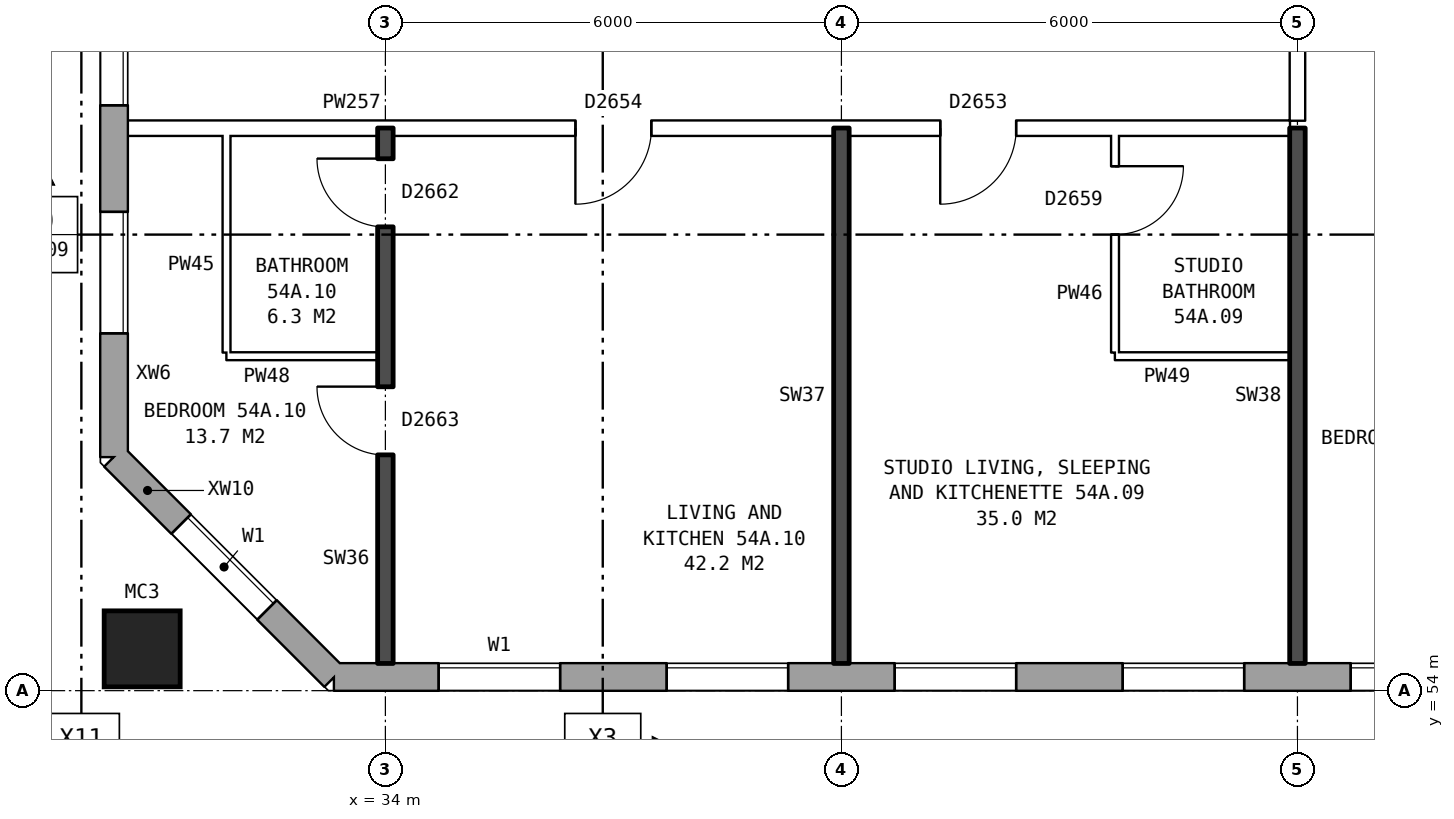
"""IFC4 building model, lengths in metres.
Left out: names, types, materials, properties, quantities, classifications, styles, units other than length and angle.
Written with IfcOpenShell. Run it as: python <this file> out.ifc"""

import sys

from ifc_helpers import new_model, si_unit, direction, frame, frame_2d, origin, origin_2d, place, context, subcontext, project, spatial, rectangle, hollow_rectangle, extrude, element, fill, save


model = new_model("IFC4")
c1 = context("Model", 3, precision=1e-05, world=origin(), true_north=direction((0.0, 1.0)))
c2 = subcontext(c1, "Body", "Model", "MODEL_VIEW")
j1 = project(units=[si_unit("LENGTHUNIT", "METRE"), si_unit("PLANEANGLEUNIT", "RADIAN")], contexts=[c1])
p1 = place(None, origin())
s1 = spatial("IfcSite", under=j1, at=p1, CompositionType="ELEMENT")
p2 = place(p1, origin())
s2 = spatial("IfcBuilding", under=s1, at=p2, CompositionType="ELEMENT")
p3 = place(p2, frame((0.0, 0.0, 191.3)))
s3 = spatial("IfcBuildingStorey", under=s2, at=p3, CompositionType="ELEMENT", Elevation=191.3)
p4 = place(p3, frame((30.8, 54.55, 0.0), z_axis=(0.0, 0.0, 1.0), x_axis=(1.0, 0.0, 0.0)))
e1 = element("IfcColumn", 1, at=p4, inside=s3, PredefinedType="COLUMN", context=c2, shape_type="SweptSolid", body=[
    extrude(hollow_rectangle(XDim=1.0, YDim=1.0, WallThickness=0.055, at=origin_2d()), origin(), (0.0, 0.0, 1.0), 3.1),
])
p5 = place(p3, frame((30.43, 57.075, 0.0), z_axis=(0.0, 0.0, 1.0), x_axis=(0.707106781187, -0.707106781187, 0.0)))
e2 = element("IfcWall", 2, at=p5, inside=s3, PredefinedType="STANDARD", context=c2, shape_type="SweptSolid", body=[
    extrude(rectangle(XDim=4.094, YDim=0.36, at=frame_2d((2.047, 0.0))), origin(), (0.0, 0.0, 1.0), 2.85),
])
p6 = place(p5, frame((1.247, 0.0, 0.8)))
e3 = element("IfcOpeningElement", 3, at=p6, cuts=e2, PredefinedType="OPENING", context=c2, shape_type="SweptSolid", body=[
    extrude(rectangle(XDim=1.6, YDim=1.8, at=frame_2d((0.8, 0.9))), frame((0.0, 0.19, 0.0), z_axis=(0.0, -1.0, 0.0), x_axis=(1.0, 0.0, 0.0)), (0.0, 0.0, 1.0), 0.38),
])
p7 = place(p3, frame((33.325, 54.18, 0.0), z_axis=(0.0, 0.0, 1.0), x_axis=(1.0, 0.0, 0.0)))
e4 = element("IfcWall", 4, at=p7, inside=s3, PredefinedType="STANDARD", context=c2, shape_type="SweptSolid", body=[
    extrude(rectangle(XDim=39.601, YDim=0.36, at=frame_2d((19.8, 0.0))), origin(), (0.0, 0.0, 1.0), 2.85),
])
p8 = place(p7, frame((1.375, 0.0, 0.8)))
e5 = element("IfcOpeningElement", 5, at=p8, cuts=e4, PredefinedType="OPENING", context=c2, shape_type="SweptSolid", body=[
    extrude(rectangle(XDim=1.6, YDim=1.8, at=frame_2d((0.8, 0.9))), frame((0.0, 0.19, 0.0), z_axis=(0.0, -1.0, 0.0), x_axis=(1.0, 0.0, 0.0)), (0.0, 0.0, 1.0), 0.38),
])
p9 = place(p7, frame((4.375, 0.0, 0.8)))
e6 = element("IfcOpeningElement", 6, at=p9, cuts=e4, PredefinedType="OPENING", context=c2, shape_type="SweptSolid", body=[
    extrude(rectangle(XDim=1.6, YDim=1.8, at=frame_2d((0.8, 0.9))), frame((0.0, 0.19, 0.0), z_axis=(0.0, -1.0, 0.0), x_axis=(1.0, 0.0, 0.0)), (0.0, 0.0, 1.0), 0.38),
])
p10 = place(p7, frame((7.375, 0.0, 0.8)))
e7 = element("IfcOpeningElement", 7, at=p10, cuts=e4, PredefinedType="OPENING", context=c2, shape_type="SweptSolid", body=[
    extrude(rectangle(XDim=1.6, YDim=1.8, at=frame_2d((0.8, 0.9))), frame((0.0, 0.19, 0.0), z_axis=(0.0, -1.0, 0.0), x_axis=(1.0, 0.0, 0.0)), (0.0, 0.0, 1.0), 0.38),
])
p11 = place(p7, frame((10.375, 0.0, 0.8)))
e8 = element("IfcOpeningElement", 8, at=p11, cuts=e4, PredefinedType="OPENING", context=c2, shape_type="SweptSolid", body=[
    extrude(rectangle(XDim=1.6, YDim=1.8, at=frame_2d((0.8, 0.9))), frame((0.0, 0.19, 0.0), z_axis=(0.0, -1.0, 0.0), x_axis=(1.0, 0.0, 0.0)), (0.0, 0.0, 1.0), 0.38),
])
p12 = place(p7, frame((13.375, 0.0, 0.8)))
e9 = element("IfcOpeningElement", 9, at=p12, cuts=e4, PredefinedType="OPENING", context=c2, shape_type="SweptSolid", body=[
    extrude(rectangle(XDim=1.6, YDim=1.8, at=frame_2d((0.8, 0.9))), frame((0.0, 0.19, 0.0), z_axis=(0.0, -1.0, 0.0), x_axis=(1.0, 0.0, 0.0)), (0.0, 0.0, 1.0), 0.38),
])
p13 = place(p7, frame((15.825, 0.0, 0.8)))
e10 = element("IfcOpeningElement", 10, at=p13, cuts=e4, PredefinedType="OPENING", context=c2, shape_type="SweptSolid", body=[
    extrude(rectangle(XDim=1.4, YDim=1.8, at=frame_2d((0.7, 0.9))), frame((0.0, 0.19, 0.0), z_axis=(0.0, -1.0, 0.0), x_axis=(1.0, 0.0, 0.0)), (0.0, 0.0, 1.0), 0.38),
])
p14 = place(p7, frame((18.975, 0.0, 0.15)))
e11 = element("IfcOpeningElement", 11, at=p14, cuts=e4, PredefinedType="OPENING", context=c2, shape_type="SweptSolid", body=[
    extrude(rectangle(XDim=1.6, YDim=1.2, at=frame_2d((0.8, 0.6))), frame((0.0, 0.19, 0.0), z_axis=(0.0, -1.0, 0.0), x_axis=(1.0, 0.0, 0.0)), (0.0, 0.0, 1.0), 0.38),
])
p15 = place(p7, frame((22.375, 0.0, 0.8)))
e12 = element("IfcOpeningElement", 12, at=p15, cuts=e4, PredefinedType="OPENING", context=c2, shape_type="SweptSolid", body=[
    extrude(rectangle(XDim=1.6, YDim=1.8, at=frame_2d((0.8, 0.9))), frame((0.0, 0.19, 0.0), z_axis=(0.0, -1.0, 0.0), x_axis=(1.0, 0.0, 0.0)), (0.0, 0.0, 1.0), 0.38),
])
p16 = place(p7, frame((25.375, 0.0, 0.8)))
e13 = element("IfcOpeningElement", 13, at=p16, cuts=e4, PredefinedType="OPENING", context=c2, shape_type="SweptSolid", body=[
    extrude(rectangle(XDim=1.6, YDim=1.8, at=frame_2d((0.8, 0.9))), frame((0.0, 0.19, 0.0), z_axis=(0.0, -1.0, 0.0), x_axis=(1.0, 0.0, 0.0)), (0.0, 0.0, 1.0), 0.38),
])
p17 = place(p7, frame((28.375, 0.0, 0.8)))
e14 = element("IfcOpeningElement", 14, at=p17, cuts=e4, PredefinedType="OPENING", context=c2, shape_type="SweptSolid", body=[
    extrude(rectangle(XDim=1.6, YDim=1.8, at=frame_2d((0.8, 0.9))), frame((0.0, 0.19, 0.0), z_axis=(0.0, -1.0, 0.0), x_axis=(1.0, 0.0, 0.0)), (0.0, 0.0, 1.0), 0.38),
])
p18 = place(p7, frame((31.375, 0.0, 0.8)))
e15 = element("IfcOpeningElement", 15, at=p18, cuts=e4, PredefinedType="OPENING", context=c2, shape_type="SweptSolid", body=[
    extrude(rectangle(XDim=1.6, YDim=1.8, at=frame_2d((0.8, 0.9))), frame((0.0, 0.19, 0.0), z_axis=(0.0, -1.0, 0.0), x_axis=(1.0, 0.0, 0.0)), (0.0, 0.0, 1.0), 0.38),
])
p19 = place(p7, frame((34.375, 0.0, 0.8)))
e16 = element("IfcOpeningElement", 16, at=p19, cuts=e4, PredefinedType="OPENING", context=c2, shape_type="SweptSolid", body=[
    extrude(rectangle(XDim=1.6, YDim=1.8, at=frame_2d((0.8, 0.9))), frame((0.0, 0.19, 0.0), z_axis=(0.0, -1.0, 0.0), x_axis=(1.0, 0.0, 0.0)), (0.0, 0.0, 1.0), 0.38),
])
p20 = place(p7, frame((37.375, 0.0, 0.8)))
e17 = element("IfcOpeningElement", 17, at=p20, cuts=e4, PredefinedType="OPENING", context=c2, shape_type="SweptSolid", body=[
    extrude(rectangle(XDim=1.6, YDim=1.8, at=frame_2d((0.8, 0.9))), frame((0.0, 0.19, 0.0), z_axis=(0.0, -1.0, 0.0), x_axis=(1.0, 0.0, 0.0)), (0.0, 0.0, 1.0), 0.38),
])
p21 = place(p7, frame((17.525, 0.0, 1.6)))
e18 = element("IfcOpeningElement", 18, at=p21, cuts=e4, PredefinedType="OPENING", context=c2, shape_type="SweptSolid", body=[
    extrude(rectangle(XDim=0.6, YDim=0.9, at=frame_2d((0.3, 0.45))), frame((0.0, 0.19, 0.0), z_axis=(0.0, -1.0, 0.0), x_axis=(1.0, 0.0, 0.0)), (0.0, 0.0, 1.0), 0.38),
])
p22 = place(p3, frame((30.43, 82.925, 0.0), z_axis=(0.0, 0.0, 1.0), x_axis=(0.0, -1.0, 0.0)))
e19 = element("IfcWall", 19, at=p22, inside=s3, PredefinedType="STANDARD", context=c2, shape_type="SweptSolid", body=[
    extrude(rectangle(XDim=25.851, YDim=0.36, at=frame_2d((12.925, 0.0))), origin(), (0.0, 0.0, 1.0), 2.85),
])
p23 = place(p22, frame((1.625, 0.0, 0.8)))
e20 = element("IfcOpeningElement", 20, at=p23, cuts=e19, PredefinedType="OPENING", context=c2, shape_type="SweptSolid", body=[
    extrude(rectangle(XDim=1.6, YDim=1.8, at=frame_2d((0.8, 0.9))), frame((0.0, 0.19, 0.0), z_axis=(0.0, -1.0, 0.0), x_axis=(1.0, 0.0, 0.0)), (0.0, 0.0, 1.0), 0.38),
])
p24 = place(p22, frame((4.625, 0.0, 0.8)))
e21 = element("IfcOpeningElement", 21, at=p24, cuts=e19, PredefinedType="OPENING", context=c2, shape_type="SweptSolid", body=[
    extrude(rectangle(XDim=1.6, YDim=1.8, at=frame_2d((0.8, 0.9))), frame((0.0, 0.19, 0.0), z_axis=(0.0, -1.0, 0.0), x_axis=(1.0, 0.0, 0.0)), (0.0, 0.0, 1.0), 0.38),
])
p25 = place(p22, frame((7.625, 0.0, 0.8)))
e22 = element("IfcOpeningElement", 22, at=p25, cuts=e19, PredefinedType="OPENING", context=c2, shape_type="SweptSolid", body=[
    extrude(rectangle(XDim=1.6, YDim=1.8, at=frame_2d((0.8, 0.9))), frame((0.0, 0.19, 0.0), z_axis=(0.0, -1.0, 0.0), x_axis=(1.0, 0.0, 0.0)), (0.0, 0.0, 1.0), 0.38),
])
p26 = place(p22, frame((10.625, 0.0, 0.8)))
e23 = element("IfcOpeningElement", 23, at=p26, cuts=e19, PredefinedType="OPENING", context=c2, shape_type="SweptSolid", body=[
    extrude(rectangle(XDim=1.6, YDim=1.8, at=frame_2d((0.8, 0.9))), frame((0.0, 0.19, 0.0), z_axis=(0.0, -1.0, 0.0), x_axis=(1.0, 0.0, 0.0)), (0.0, 0.0, 1.0), 0.38),
])
p27 = place(p22, frame((13.625, 0.0, 0.8)))
e24 = element("IfcOpeningElement", 24, at=p27, cuts=e19, PredefinedType="OPENING", context=c2, shape_type="SweptSolid", body=[
    extrude(rectangle(XDim=1.6, YDim=1.8, at=frame_2d((0.8, 0.9))), frame((0.0, 0.19, 0.0), z_axis=(0.0, -1.0, 0.0), x_axis=(1.0, 0.0, 0.0)), (0.0, 0.0, 1.0), 0.38),
])
p28 = place(p22, frame((16.625, 0.0, 0.8)))
e25 = element("IfcOpeningElement", 25, at=p28, cuts=e19, PredefinedType="OPENING", context=c2, shape_type="SweptSolid", body=[
    extrude(rectangle(XDim=1.6, YDim=1.8, at=frame_2d((0.8, 0.9))), frame((0.0, 0.19, 0.0), z_axis=(0.0, -1.0, 0.0), x_axis=(1.0, 0.0, 0.0)), (0.0, 0.0, 1.0), 0.38),
])
p29 = place(p22, frame((19.625, 0.0, 0.8)))
e26 = element("IfcOpeningElement", 26, at=p29, cuts=e19, PredefinedType="OPENING", context=c2, shape_type="SweptSolid", body=[
    extrude(rectangle(XDim=1.6, YDim=1.8, at=frame_2d((0.8, 0.9))), frame((0.0, 0.19, 0.0), z_axis=(0.0, -1.0, 0.0), x_axis=(1.0, 0.0, 0.0)), (0.0, 0.0, 1.0), 0.38),
])
p30 = place(p22, frame((22.625, 0.0, 0.8)))
e27 = element("IfcOpeningElement", 27, at=p30, cuts=e19, PredefinedType="OPENING", context=c2, shape_type="SweptSolid", body=[
    extrude(rectangle(XDim=1.6, YDim=1.8, at=frame_2d((0.8, 0.9))), frame((0.0, 0.19, 0.0), z_axis=(0.0, -1.0, 0.0), x_axis=(1.0, 0.0, 0.0)), (0.0, 0.0, 1.0), 0.38),
])
p31 = place(p3, frame((31.91, 58.4, 0.0), z_axis=(0.0, 0.0, 1.0), x_axis=(1.0, 0.0, 0.0)))
e28 = element("IfcWall", 28, at=p31, inside=s3, PredefinedType="PARTITIONING", context=c2, shape_type="SweptSolid", body=[
    extrude(rectangle(XDim=1.99, YDim=0.1, at=frame_2d((0.995, 0.0))), origin(), (0.0, 0.0, 1.0), 2.85),
])
p32 = place(p3, frame((43.6, 58.4, 0.0), z_axis=(0.0, 0.0, 1.0), x_axis=(1.0, 0.0, 0.0)))
e29 = element("IfcWall", 29, at=p32, inside=s3, PredefinedType="PARTITIONING", context=c2, shape_type="SweptSolid", body=[
    extrude(rectangle(XDim=2.3, YDim=0.1, at=frame_2d((1.15, 0.0))), origin(), (0.0, 0.0, 1.0), 2.85),
])
p33 = place(p3, frame((30.61, 61.4, 0.0), z_axis=(0.0, 0.0, 1.0), x_axis=(1.0, 0.0, 0.0)))
e30 = element("IfcWall", 30, at=p33, inside=s3, PredefinedType="PARTITIONING", context=c2, shape_type="SweptSolid", body=[
    extrude(rectangle(XDim=15.29, YDim=0.2, at=frame_2d((7.645, 0.0))), origin(), (0.0, 0.0, 1.0), 2.85),
])
p34 = place(p33, frame((10.69, 0.0, 0.0)))
e31 = element("IfcOpeningElement", 31, at=p34, cuts=e30, PredefinedType="OPENING", context=c2, shape_type="SweptSolid", body=[
    extrude(rectangle(XDim=1.0, YDim=2.1, at=frame_2d((0.5, 1.05))), frame((0.0, 0.11, 0.0), z_axis=(0.0, -1.0, 0.0), x_axis=(1.0, 0.0, 0.0)), (0.0, 0.0, 1.0), 0.22),
])
p35 = place(p33, frame((5.89, 0.0, 0.0)))
e32 = element("IfcOpeningElement", 32, at=p35, cuts=e30, PredefinedType="OPENING", context=c2, shape_type="SweptSolid", body=[
    extrude(rectangle(XDim=1.0, YDim=2.1, at=frame_2d((0.5, 1.05))), frame((0.0, 0.11, 0.0), z_axis=(0.0, -1.0, 0.0), x_axis=(1.0, 0.0, 0.0)), (0.0, 0.0, 1.0), 0.22),
])
p36 = place(p3, frame((31.91, 58.45, 0.0), z_axis=(0.0, 0.0, 1.0), x_axis=(0.0, 1.0, 0.0)))
e33 = element("IfcWall", 33, at=p36, inside=s3, PredefinedType="PARTITIONING", context=c2, shape_type="SweptSolid", body=[
    extrude(rectangle(XDim=2.85, YDim=0.1, at=frame_2d((1.425, 0.0))), origin(), (0.0, 0.0, 1.0), 2.85),
])
p37 = place(p3, frame((34.0, 54.36, 0.0), z_axis=(0.0, 0.0, 1.0), x_axis=(0.0, 1.0, 0.0)))
e34 = element("IfcWall", 34, at=p37, inside=s3, PredefinedType="SOLIDWALL", context=c2, shape_type="SweptSolid", body=[
    extrude(rectangle(XDim=7.04, YDim=0.2, at=frame_2d((3.52, 0.0))), origin(), (0.0, 0.0, 1.0), 2.85),
])
p38 = place(p37, frame((2.74, 0.0, 0.0)))
e35 = element("IfcOpeningElement", 35, at=p38, cuts=e34, PredefinedType="OPENING", context=c2, shape_type="SweptSolid", body=[
    extrude(rectangle(XDim=0.9, YDim=2.1, at=frame_2d((0.45, 1.05))), frame((0.0, 0.11, 0.0), z_axis=(0.0, -1.0, 0.0), x_axis=(1.0, 0.0, 0.0)), (0.0, 0.0, 1.0), 0.22),
])
p39 = place(p37, frame((5.74, 0.0, 0.0)))
e36 = element("IfcOpeningElement", 36, at=p39, cuts=e34, PredefinedType="OPENING", context=c2, shape_type="SweptSolid", body=[
    extrude(rectangle(XDim=0.9, YDim=2.1, at=frame_2d((0.45, 1.05))), frame((0.0, 0.11, 0.0), z_axis=(0.0, -1.0, 0.0), x_axis=(1.0, 0.0, 0.0)), (0.0, 0.0, 1.0), 0.22),
])
p40 = place(p3, frame((40.0, 54.36, 0.0), z_axis=(0.0, 0.0, 1.0), x_axis=(0.0, 1.0, 0.0)))
e37 = element("IfcWall", 37, at=p40, inside=s3, PredefinedType="SOLIDWALL", context=c2, shape_type="SweptSolid", body=[
    extrude(rectangle(XDim=7.04, YDim=0.2, at=frame_2d((3.52, 0.0))), origin(), (0.0, 0.0, 1.0), 2.85),
])
p41 = place(p3, frame((43.6, 58.45, 0.0), z_axis=(0.0, 0.0, 1.0), x_axis=(0.0, 1.0, 0.0)))
e38 = element("IfcWall", 38, at=p41, inside=s3, PredefinedType="PARTITIONING", context=c2, shape_type="SweptSolid", body=[
    extrude(rectangle(XDim=2.85, YDim=0.1, at=frame_2d((1.425, 0.0))), origin(), (0.0, 0.0, 1.0), 2.85),
])
p42 = place(p41, frame((1.55, 0.0, 0.0)))
e39 = element("IfcOpeningElement", 39, at=p42, cuts=e38, PredefinedType="OPENING", context=c2, shape_type="SweptSolid", body=[
    extrude(rectangle(XDim=0.9, YDim=2.1, at=frame_2d((0.45, 1.05))), frame((0.0, 0.06, 0.0), z_axis=(0.0, -1.0, 0.0), x_axis=(1.0, 0.0, 0.0)), (0.0, 0.0, 1.0), 0.12),
])
p43 = place(p3, frame((46.0, 54.36, 0.0), z_axis=(0.0, 0.0, 1.0), x_axis=(0.0, 1.0, 0.0)))
e40 = element("IfcWall", 40, at=p43, inside=s3, PredefinedType="SOLIDWALL", context=c2, shape_type="SweptSolid", body=[
    extrude(rectangle(XDim=7.04, YDim=0.2, at=frame_2d((3.52, 0.0))), origin(), (0.0, 0.0, 1.0), 2.85),
])
p44 = place(p3, frame((46.0, 61.5, 0.0), z_axis=(0.0, 0.0, 1.0), x_axis=(0.0, 1.0, 0.0)))
e41 = element("IfcWall", 41, at=p44, inside=s3, PredefinedType="PARTITIONING", context=c2, shape_type="SweptSolid", body=[
    extrude(rectangle(XDim=2.2, YDim=0.2, at=frame_2d((1.1, 0.0))), origin(), (0.0, 0.0, 1.0), 2.85),
])
p45 = place(p6, origin())
e42 = element("IfcWindow", 42, at=p45, inside=s3, PartitioningType="SINGLE_PANEL", PredefinedType="WINDOW", context=c2, shape_type="SweptSolid", body=[
    extrude(rectangle(XDim=1.6, YDim=1.8, at=frame_2d((0.8, 0.9))), frame((0.0, 0.15, 0.0), z_axis=(0.0, -1.0, 0.0), x_axis=(1.0, 0.0, 0.0)), (0.0, 0.0, 1.0), 0.06),
])
fill(e3, e42)
p46 = place(p8, origin())
e43 = element("IfcWindow", 43, at=p46, inside=s3, PartitioningType="SINGLE_PANEL", PredefinedType="WINDOW", context=c2, shape_type="SweptSolid", body=[
    extrude(rectangle(XDim=1.6, YDim=1.8, at=frame_2d((0.8, 0.9))), frame((0.0, 0.15, 0.0), z_axis=(0.0, -1.0, 0.0), x_axis=(1.0, 0.0, 0.0)), (0.0, 0.0, 1.0), 0.06),
])
fill(e5, e43)
p47 = place(p9, origin())
e44 = element("IfcWindow", 44, at=p47, inside=s3, PartitioningType="SINGLE_PANEL", PredefinedType="WINDOW", context=c2, shape_type="SweptSolid", body=[
    extrude(rectangle(XDim=1.6, YDim=1.8, at=frame_2d((0.8, 0.9))), frame((0.0, 0.15, 0.0), z_axis=(0.0, -1.0, 0.0), x_axis=(1.0, 0.0, 0.0)), (0.0, 0.0, 1.0), 0.06),
])
fill(e6, e44)
p48 = place(p10, origin())
e45 = element("IfcWindow", 45, at=p48, inside=s3, PartitioningType="SINGLE_PANEL", PredefinedType="WINDOW", context=c2, shape_type="SweptSolid", body=[
    extrude(rectangle(XDim=1.6, YDim=1.8, at=frame_2d((0.8, 0.9))), frame((0.0, 0.15, 0.0), z_axis=(0.0, -1.0, 0.0), x_axis=(1.0, 0.0, 0.0)), (0.0, 0.0, 1.0), 0.06),
])
fill(e7, e45)
p49 = place(p11, origin())
e46 = element("IfcWindow", 46, at=p49, inside=s3, PartitioningType="SINGLE_PANEL", PredefinedType="WINDOW", context=c2, shape_type="SweptSolid", body=[
    extrude(rectangle(XDim=1.6, YDim=1.8, at=frame_2d((0.8, 0.9))), frame((0.0, 0.15, 0.0), z_axis=(0.0, -1.0, 0.0), x_axis=(1.0, 0.0, 0.0)), (0.0, 0.0, 1.0), 0.06),
])
fill(e8, e46)
p50 = place(p12, origin())
e47 = element("IfcWindow", 47, at=p50, inside=s3, PartitioningType="SINGLE_PANEL", PredefinedType="WINDOW", context=c2, shape_type="SweptSolid", body=[
    extrude(rectangle(XDim=1.6, YDim=1.8, at=frame_2d((0.8, 0.9))), frame((0.0, 0.15, 0.0), z_axis=(0.0, -1.0, 0.0), x_axis=(1.0, 0.0, 0.0)), (0.0, 0.0, 1.0), 0.06),
])
fill(e9, e47)
p51 = place(p29, origin())
e48 = element("IfcWindow", 48, at=p51, inside=s3, PartitioningType="SINGLE_PANEL", PredefinedType="WINDOW", context=c2, shape_type="SweptSolid", body=[
    extrude(rectangle(XDim=1.6, YDim=1.8, at=frame_2d((0.8, 0.9))), frame((0.0, 0.15, 0.0), z_axis=(0.0, -1.0, 0.0), x_axis=(1.0, 0.0, 0.0)), (0.0, 0.0, 1.0), 0.06),
])
fill(e26, e48)
p52 = place(p30, origin())
e49 = element("IfcWindow", 49, at=p52, inside=s3, PartitioningType="SINGLE_PANEL", PredefinedType="WINDOW", context=c2, shape_type="SweptSolid", body=[
    extrude(rectangle(XDim=1.6, YDim=1.8, at=frame_2d((0.8, 0.9))), frame((0.0, 0.15, 0.0), z_axis=(0.0, -1.0, 0.0), x_axis=(1.0, 0.0, 0.0)), (0.0, 0.0, 1.0), 0.06),
])
fill(e27, e49)
p53 = place(p34, frame((1.0, 0.0, 0.0), z_axis=(0.0, 0.0, 1.0), x_axis=(-1.0, 0.0, 0.0)))
e50 = element("IfcDoor", 50, at=p53, inside=s3, OperationType="SINGLE_SWING_RIGHT", PredefinedType="DOOR", context=c2, shape_type="SweptSolid", body=[
    extrude(rectangle(XDim=1.0, YDim=2.1, at=frame_2d((0.5, 1.05))), frame((0.0, 0.025, 0.0), z_axis=(0.0, -1.0, 0.0), x_axis=(1.0, 0.0, 0.0)), (0.0, 0.0, 1.0), 0.05),
])
fill(e31, e50)
p54 = place(p42, frame((0.9, 0.0, 0.0), z_axis=(0.0, 0.0, 1.0), x_axis=(-1.0, 0.0, 0.0)))
e51 = element("IfcDoor", 51, at=p54, inside=s3, OperationType="SINGLE_SWING_LEFT", PredefinedType="DOOR", context=c2, shape_type="SweptSolid", body=[
    extrude(rectangle(XDim=0.9, YDim=2.1, at=frame_2d((0.45, 1.05))), frame((0.0, 0.025, 0.0), z_axis=(0.0, -1.0, 0.0), x_axis=(1.0, 0.0, 0.0)), (0.0, 0.0, 1.0), 0.05),
])
fill(e39, e51)
p55 = place(p38, origin())
e52 = element("IfcDoor", 52, at=p55, inside=s3, OperationType="SINGLE_SWING_RIGHT", PredefinedType="DOOR", context=c2, shape_type="SweptSolid", body=[
    extrude(rectangle(XDim=0.9, YDim=2.1, at=frame_2d((0.45, 1.05))), frame((0.0, 0.025, 0.0), z_axis=(0.0, -1.0, 0.0), x_axis=(1.0, 0.0, 0.0)), (0.0, 0.0, 1.0), 0.05),
])
fill(e35, e52)
p56 = place(p35, frame((1.0, 0.0, 0.0), z_axis=(0.0, 0.0, 1.0), x_axis=(-1.0, 0.0, 0.0)))
e53 = element("IfcDoor", 53, at=p56, inside=s3, OperationType="SINGLE_SWING_RIGHT", PredefinedType="DOOR", context=c2, shape_type="SweptSolid", body=[
    extrude(rectangle(XDim=1.0, YDim=2.1, at=frame_2d((0.5, 1.05))), frame((0.0, 0.025, 0.0), z_axis=(0.0, -1.0, 0.0), x_axis=(1.0, 0.0, 0.0)), (0.0, 0.0, 1.0), 0.05),
])
fill(e32, e53)
p57 = place(p39, origin())
e54 = element("IfcDoor", 54, at=p57, inside=s3, OperationType="SINGLE_SWING_RIGHT", PredefinedType="DOOR", context=c2, shape_type="SweptSolid", body=[
    extrude(rectangle(XDim=0.9, YDim=2.1, at=frame_2d((0.45, 1.05))), frame((0.0, 0.025, 0.0), z_axis=(0.0, -1.0, 0.0), x_axis=(1.0, 0.0, 0.0)), (0.0, 0.0, 1.0), 0.05),
])
fill(e36, e54)
save(model, sys.argv[1])
